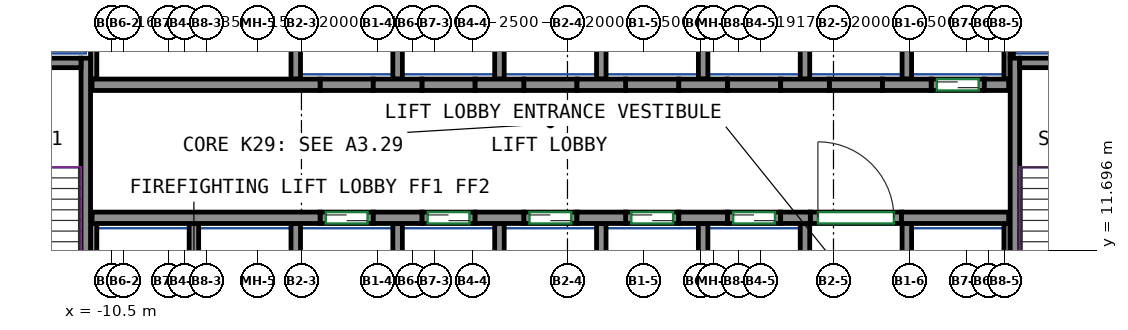
"""IFC4 building model, lengths in metres.
Left out: names, types, materials, properties, quantities, classifications, styles, units other than length and angle.
Written with IfcOpenShell. Run it as: python <this file> out.ifc"""

import sys

from ifc_helpers import new_model, si_unit, direction, frame, frame_2d, origin, place, context, subcontext, project, spatial, rectangle, extrude, source, transform, mapped, element, fill, save


model = new_model("IFC4")
c1 = context("Model", 3, precision=1e-05, world=origin(), true_north=direction((0.0, 1.0)))
c2 = subcontext(c1, "Body", "Model", "MODEL_VIEW")
j1 = project(units=[si_unit("LENGTHUNIT", "METRE"), si_unit("PLANEANGLEUNIT", "RADIAN")], contexts=[c1])
p1 = place(None, origin())
s1 = spatial("IfcSite", under=j1, at=p1, CompositionType="ELEMENT")
p2 = place(p1, origin())
s2 = spatial("IfcBuilding", under=s1, at=p2, CompositionType="ELEMENT")
p3 = place(p2, frame((0.0, 0.0, 120.6)))
s3 = spatial("IfcBuildingStorey", under=s2, at=p3, CompositionType="ELEMENT", Elevation=120.6)
m1 = source(origin(), c2, "Body", "SweptSolid", [
    extrude(rectangle(XDim=7.75, YDim=0.25, at=frame_2d((3.875, 0.0))), origin(), (0.0, 0.0, 1.0), 3.72),
])
p4 = place(p3, frame((-11.175, 9.0, 0.0), z_axis=(0.0, 0.0, 1.0), x_axis=(0.0, 1.0, 0.0)))
e1 = element("IfcWall", 1, at=p4, inside=s3, PredefinedType="SHEAR", context=c2, shape_type="MappedRepresentation", body=[
    mapped(m1, transform((0.0, 0.0, 0.0))),
])
m2 = source(origin(), c2, "Body", "SweptSolid", [
    extrude(rectangle(XDim=3.7, YDim=0.25, at=frame_2d((1.85, 0.0))), origin(), (0.0, 0.0, 1.0), 3.72),
])
p5 = place(p3, frame((-15.0, 16.625, 0.0), z_axis=(0.0, 0.0, 1.0), x_axis=(1.0, 0.0, 0.0)))
e2 = element("IfcWall", 2, at=p5, inside=s3, PredefinedType="SHEAR", context=c2, shape_type="MappedRepresentation", body=[
    mapped(m2, transform((0.0, 0.0, 0.0))),
])
p6 = place(p3, frame((13.275, 9.0, 0.0), z_axis=(0.0, 0.0, 1.0), x_axis=(0.0, 1.0, 0.0)))
e3 = element("IfcWall", 3, at=p6, inside=s3, PredefinedType="SHEAR", context=c2, shape_type="MappedRepresentation", body=[
    mapped(m1, transform((0.0, 0.0, 0.0))),
])
m3 = source(origin(), c2, "Body", "SweptSolid", [
    extrude(rectangle(XDim=3.7, YDim=0.25, at=frame_2d((1.85, 0.0))), origin(), (0.0, 0.0, 1.0), 3.72),
])
p7 = place(p3, frame((13.4, 16.625, 0.0), z_axis=(0.0, 0.0, 1.0), x_axis=(1.0, 0.0, 0.0)))
e4 = element("IfcWall", 4, at=p7, inside=s3, PredefinedType="SHEAR", context=c2, shape_type="MappedRepresentation", body=[
    mapped(m3, transform((0.0, 0.0, 0.0))),
])
m4 = source(origin(), c2, "Body", "SweptSolid", [
    extrude(rectangle(XDim=6.0, YDim=0.3, at=frame_2d((3.0, 0.0))), origin(), (0.0, 0.0, 1.0), 3.72),
])
p8 = place(p3, frame((-11.01, 12.55, 0.0), z_axis=(0.0, 0.0, 1.0), x_axis=(1.0, 0.0, 0.0)))
e5 = element("IfcWall", 5, at=p8, inside=s3, PredefinedType="SHEAR", context=c2, shape_type="MappedRepresentation", body=[
    mapped(m4, transform((0.0, 0.0, 0.0))),
])
m5 = source(origin(), c2, "Body", "SweptSolid", [
    extrude(rectangle(XDim=1.28, YDim=0.3, at=frame_2d((0.64, 0.0))), origin(), (0.0, 0.0, 1.0), 3.72),
])
for number, where, z_axis, x_axis in (
    (6, (-3.61, 12.55, 0.0), (0.0, 0.0, 1.0), (1.0, 0.0, 0.0)),
    (7, (-0.93, 12.55, 0.0), (0.0, 0.0, 1.0), (1.0, 0.0, 0.0)),
    (8, (1.75, 12.55, 0.0), (0.0, 0.0, 1.0), (1.0, 0.0, 0.0)),
    (9, (4.43, 12.55, 0.0), (0.0, 0.0, 1.0), (1.0, 0.0, 0.0)),
):
    element("IfcWall", number, at=place(p3, frame(where, z_axis=z_axis, x_axis=x_axis)), inside=s3, PredefinedType="SHEAR", context=c2, shape_type="MappedRepresentation", body=[
        mapped(m5, transform((0.0, 0.0, 0.0))),
    ])
m6 = source(origin(), c2, "Body", "SweptSolid", [
    extrude(rectangle(XDim=0.78, YDim=0.3, at=frame_2d((0.39, 0.0))), origin(), (0.0, 0.0, 1.0), 3.72),
])
p9 = place(p3, frame((7.11, 12.55, 0.0), z_axis=(0.0, 0.0, 1.0), x_axis=(1.0, 0.0, 0.0)))
e10 = element("IfcWall", 10, at=p9, inside=s3, PredefinedType="SHEAR", context=c2, shape_type="MappedRepresentation", body=[
    mapped(m6, transform((0.0, 0.0, 0.0))),
])
m7 = source(origin(), c2, "Body", "SweptSolid", [
    extrude(rectangle(XDim=2.82, YDim=0.3, at=frame_2d((1.41, 0.0))), origin(), (0.0, 0.0, 1.0), 3.72),
])
p10 = place(p3, frame((10.29, 12.55, 0.0), z_axis=(0.0, 0.0, 1.0), x_axis=(1.0, 0.0, 0.0)))
e11 = element("IfcWall", 11, at=p10, inside=s3, PredefinedType="SHEAR", context=c2, shape_type="MappedRepresentation", body=[
    mapped(m7, transform((0.0, 0.0, 0.0))),
])
p11 = place(p3, frame((-11.01, 16.05, 0.0), z_axis=(0.0, 0.0, 1.0), x_axis=(1.0, 0.0, 0.0)))
e12 = element("IfcWall", 12, at=p11, inside=s3, PredefinedType="SHEAR", context=c2, shape_type="MappedRepresentation", body=[
    mapped(m4, transform((0.0, 0.0, 0.0))),
])
for number, where, z_axis, x_axis in (
    (13, (-3.61, 16.05, 0.0), (0.0, 0.0, 1.0), (1.0, 0.0, 0.0)),
    (14, (-0.93, 16.05, 0.0), (0.0, 0.0, 1.0), (1.0, 0.0, 0.0)),
    (15, (1.75, 16.05, 0.0), (0.0, 0.0, 1.0), (1.0, 0.0, 0.0)),
    (16, (4.43, 16.05, 0.0), (0.0, 0.0, 1.0), (1.0, 0.0, 0.0)),
):
    element("IfcWall", number, at=place(p3, frame(where, z_axis=z_axis, x_axis=x_axis)), inside=s3, PredefinedType="SHEAR", context=c2, shape_type="MappedRepresentation", body=[
        mapped(m5, transform((0.0, 0.0, 0.0))),
    ])
m8 = source(origin(), c2, "Body", "SweptSolid", [
    extrude(rectangle(XDim=1.28, YDim=0.3, at=frame_2d((0.64, 0.0))), origin(), (0.0, 0.0, 1.0), 3.72),
])
p12 = place(p3, frame((7.11, 16.05, 0.0), z_axis=(0.0, 0.0, 1.0), x_axis=(1.0, 0.0, 0.0)))
e17 = element("IfcWall", 17, at=p12, inside=s3, PredefinedType="SHEAR", context=c2, shape_type="MappedRepresentation", body=[
    mapped(m8, transform((0.0, 0.0, 0.0))),
])
p13 = place(p3, frame((9.79, 16.05, 0.0), z_axis=(0.0, 0.0, 1.0), x_axis=(1.0, 0.0, 0.0)))
e18 = element("IfcWall", 18, at=p13, inside=s3, PredefinedType="SHEAR", context=c2, shape_type="MappedRepresentation", body=[
    mapped(m5, transform((0.0, 0.0, 0.0))),
])
m9 = source(origin(), c2, "Body", "SweptSolid", [
    extrude(rectangle(XDim=0.64, YDim=0.3, at=frame_2d((0.32, 0.0))), origin(), (0.0, 0.0, 1.0), 3.72),
])
p14 = place(p3, frame((12.47, 16.05, 0.0), z_axis=(0.0, 0.0, 1.0), x_axis=(1.0, 0.0, 0.0)))
e19 = element("IfcWall", 19, at=p14, inside=s3, PredefinedType="SHEAR", context=c2, shape_type="MappedRepresentation", body=[
    mapped(m9, transform((0.0, 0.0, 0.0))),
])
m10 = source(origin(), c2, "Body", "SweptSolid", [
    extrude(rectangle(XDim=1.4, YDim=0.3, at=frame_2d((0.7, 0.0))), origin(), (0.0, 0.0, 1.0), 3.72),
])
p15 = place(p3, frame((-5.01, 12.55, 0.0), z_axis=(0.0, 0.0, 1.0), x_axis=(1.0, 0.0, 0.0)))
e20 = element("IfcWall", 20, at=p15, inside=s3, PredefinedType="PARTITIONING", context=c2, shape_type="MappedRepresentation", body=[
    mapped(m10, transform((0.0, 0.0, 0.0))),
])
p16 = place(p15, frame((0.15, 0.0, 0.0)))
e21 = element("IfcOpeningElement", 21, at=p16, cuts=e20, PredefinedType="OPENING", context=c2, shape_type="SweptSolid", body=[
    extrude(rectangle(XDim=1.1, YDim=2.1, at=frame_2d((0.55, 1.05))), frame((0.0, 0.16, 0.0), z_axis=(0.0, -1.0, 0.0), x_axis=(1.0, 0.0, 0.0)), (0.0, 0.0, 1.0), 0.32),
])
m11 = source(origin(), c2, "Body", "SweptSolid", [
    extrude(rectangle(XDim=1.4, YDim=0.3, at=frame_2d((0.7, 0.0))), origin(), (0.0, 0.0, 1.0), 3.72),
])
p17 = place(p3, frame((-2.33, 12.55, 0.0), z_axis=(0.0, 0.0, 1.0), x_axis=(1.0, 0.0, 0.0)))
e22 = element("IfcWall", 22, at=p17, inside=s3, PredefinedType="PARTITIONING", context=c2, shape_type="MappedRepresentation", body=[
    mapped(m11, transform((0.0, 0.0, 0.0))),
])
p18 = place(p17, frame((0.15, 0.0, 0.0)))
e23 = element("IfcOpeningElement", 23, at=p18, cuts=e22, PredefinedType="OPENING", context=c2, shape_type="SweptSolid", body=[
    extrude(rectangle(XDim=1.1, YDim=2.1, at=frame_2d((0.55, 1.05))), frame((0.0, 0.16, 0.0), z_axis=(0.0, -1.0, 0.0), x_axis=(1.0, 0.0, 0.0)), (0.0, 0.0, 1.0), 0.32),
])
p19 = place(p3, frame((0.35, 12.55, 0.0), z_axis=(0.0, 0.0, 1.0), x_axis=(1.0, 0.0, 0.0)))
e24 = element("IfcWall", 24, at=p19, inside=s3, PredefinedType="PARTITIONING", context=c2, shape_type="MappedRepresentation", body=[
    mapped(m10, transform((0.0, 0.0, 0.0))),
])
p20 = place(p19, frame((0.15, 0.0, 0.0)))
e25 = element("IfcOpeningElement", 25, at=p20, cuts=e24, PredefinedType="OPENING", context=c2, shape_type="SweptSolid", body=[
    extrude(rectangle(XDim=1.1, YDim=2.1, at=frame_2d((0.55, 1.05))), frame((0.0, 0.16, 0.0), z_axis=(0.0, -1.0, 0.0), x_axis=(1.0, 0.0, 0.0)), (0.0, 0.0, 1.0), 0.32),
])
p21 = place(p3, frame((3.03, 12.55, 0.0), z_axis=(0.0, 0.0, 1.0), x_axis=(1.0, 0.0, 0.0)))
e26 = element("IfcWall", 26, at=p21, inside=s3, PredefinedType="PARTITIONING", context=c2, shape_type="MappedRepresentation", body=[
    mapped(m10, transform((0.0, 0.0, 0.0))),
])
p22 = place(p21, frame((0.15, 0.0, 0.0)))
e27 = element("IfcOpeningElement", 27, at=p22, cuts=e26, PredefinedType="OPENING", context=c2, shape_type="SweptSolid", body=[
    extrude(rectangle(XDim=1.1, YDim=2.1, at=frame_2d((0.55, 1.05))), frame((0.0, 0.16, 0.0), z_axis=(0.0, -1.0, 0.0), x_axis=(1.0, 0.0, 0.0)), (0.0, 0.0, 1.0), 0.32),
])
p23 = place(p3, frame((5.71, 12.55, 0.0), z_axis=(0.0, 0.0, 1.0), x_axis=(1.0, 0.0, 0.0)))
e28 = element("IfcWall", 28, at=p23, inside=s3, PredefinedType="PARTITIONING", context=c2, shape_type="MappedRepresentation", body=[
    mapped(m11, transform((0.0, 0.0, 0.0))),
])
p24 = place(p23, frame((0.15, 0.0, 0.0)))
e29 = element("IfcOpeningElement", 29, at=p24, cuts=e28, PredefinedType="OPENING", context=c2, shape_type="SweptSolid", body=[
    extrude(rectangle(XDim=1.1, YDim=2.1, at=frame_2d((0.55, 1.05))), frame((0.0, 0.16, 0.0), z_axis=(0.0, -1.0, 0.0), x_axis=(1.0, 0.0, 0.0)), (0.0, 0.0, 1.0), 0.32),
])
p25 = place(p3, frame((11.07, 16.05, 0.0), z_axis=(0.0, 0.0, 1.0), x_axis=(1.0, 0.0, 0.0)))
e30 = element("IfcWall", 30, at=p25, inside=s3, PredefinedType="PARTITIONING", context=c2, shape_type="MappedRepresentation", body=[
    mapped(m10, transform((0.0, 0.0, 0.0))),
])
p26 = place(p25, frame((0.15, 0.0, 0.0)))
e31 = element("IfcOpeningElement", 31, at=p26, cuts=e30, PredefinedType="OPENING", context=c2, shape_type="SweptSolid", body=[
    extrude(rectangle(XDim=1.1, YDim=2.1, at=frame_2d((0.55, 1.05))), frame((0.0, 0.16, 0.0), z_axis=(0.0, -1.0, 0.0), x_axis=(1.0, 0.0, 0.0)), (0.0, 0.0, 1.0), 0.32),
])
m12 = source(origin(), c2, "Body", "SweptSolid", [
    extrude(rectangle(XDim=2.4, YDim=0.3, at=frame_2d((1.2, 0.0))), origin(), (0.0, 0.0, 1.0), 3.72),
])
p27 = place(p3, frame((7.89, 12.55, 0.0), z_axis=(0.0, 0.0, 1.0), x_axis=(1.0, 0.0, 0.0)))
e32 = element("IfcWall", 32, at=p27, inside=s3, PredefinedType="PARTITIONING", context=c2, shape_type="MappedRepresentation", body=[
    mapped(m12, transform((0.0, 0.0, 0.0))),
])
p28 = place(p27, frame((0.2, 0.0, 0.0)))
e33 = element("IfcOpeningElement", 33, at=p28, cuts=e32, PredefinedType="OPENING", context=c2, shape_type="SweptSolid", body=[
    extrude(rectangle(XDim=2.0, YDim=2.1, at=frame_2d((1.0, 1.05))), frame((0.0, 0.16, 0.0), z_axis=(0.0, -1.0, 0.0), x_axis=(1.0, 0.0, 0.0)), (0.0, 0.0, 1.0), 0.32),
])
p29 = place(p3, frame((-5.01, 16.05, 0.0), z_axis=(0.0, 0.0, 1.0), x_axis=(1.0, 0.0, 0.0)))
e34 = element("IfcWall", 34, at=p29, inside=s3, PredefinedType="PARTITIONING", context=c2, shape_type="MappedRepresentation", body=[
    mapped(m10, transform((0.0, 0.0, 0.0))),
])
p30 = place(p3, frame((-2.33, 16.05, 0.0), z_axis=(0.0, 0.0, 1.0), x_axis=(1.0, 0.0, 0.0)))
e35 = element("IfcWall", 35, at=p30, inside=s3, PredefinedType="PARTITIONING", context=c2, shape_type="MappedRepresentation", body=[
    mapped(m11, transform((0.0, 0.0, 0.0))),
])
for number, where, z_axis, x_axis in (
    (36, (0.35, 16.05, 0.0), (0.0, 0.0, 1.0), (1.0, 0.0, 0.0)),
    (37, (3.03, 16.05, 0.0), (0.0, 0.0, 1.0), (1.0, 0.0, 0.0)),
):
    element("IfcWall", number, at=place(p3, frame(where, z_axis=z_axis, x_axis=x_axis)), inside=s3, PredefinedType="PARTITIONING", context=c2, shape_type="MappedRepresentation", body=[
        mapped(m10, transform((0.0, 0.0, 0.0))),
    ])
for number, where, z_axis, x_axis in (
    (38, (5.71, 16.05, 0.0), (0.0, 0.0, 1.0), (1.0, 0.0, 0.0)),
    (39, (8.39, 16.05, 0.0), (0.0, 0.0, 1.0), (1.0, 0.0, 0.0)),
):
    element("IfcWall", number, at=place(p3, frame(where, z_axis=z_axis, x_axis=x_axis)), inside=s3, PredefinedType="PARTITIONING", context=c2, shape_type="MappedRepresentation", body=[
        mapped(m11, transform((0.0, 0.0, 0.0))),
    ])
m13 = source(origin(), c2, "Body", "SweptSolid", [
    extrude(rectangle(XDim=3.275, YDim=0.165, at=frame_2d((1.638, 0.0))), origin(), (0.0, 0.0, 1.0), 3.72),
])
p31 = place(p3, frame((13.067, 16.2, 0.0), z_axis=(0.0, 0.0, 1.0), x_axis=(0.0, 1.0, 0.0)))
e40 = element("IfcWall", 40, at=p31, inside=s3, PredefinedType="PARTITIONING", context=c2, shape_type="MappedRepresentation", body=[
    mapped(m13, transform((0.0, 0.0, 0.0))),
])
m14 = source(origin(), c2, "Body", "SweptSolid", [
    extrude(rectangle(XDim=4.8, YDim=0.165, at=frame_2d((2.4, 0.0))), origin(), (0.0, 0.0, 1.0), 3.72),
])
p32 = place(p3, frame((-10.968, 16.2, 0.0), z_axis=(0.0, 0.0, 1.0), x_axis=(0.0, 1.0, 0.0)))
e41 = element("IfcWall", 41, at=p32, inside=s3, PredefinedType="PARTITIONING", context=c2, shape_type="MappedRepresentation", body=[
    mapped(m14, transform((0.0, 0.0, 0.0))),
])
m15 = source(origin(), c2, "Body", "SweptSolid", [
    extrude(rectangle(XDim=3.275, YDim=0.25, at=frame_2d((1.638, 0.0))), origin(), (0.0, 0.0, 1.0), 3.72),
])
p33 = place(p3, frame((10.43, 16.2, 0.0), z_axis=(0.0, 0.0, 1.0), x_axis=(0.0, 1.0, 0.0)))
e42 = element("IfcWall", 42, at=p33, inside=s3, PredefinedType="PARTITIONING", context=c2, shape_type="MappedRepresentation", body=[
    mapped(m15, transform((0.0, 0.0, 0.0))),
])
m16 = source(origin(), c2, "Body", "SweptSolid", [
    extrude(rectangle(XDim=2.725, YDim=0.085, at=frame_2d((1.363, 0.0))), origin(), (0.0, 0.0, 1.0), 3.72),
])
p34 = place(p3, frame((13.192, 16.75, 0.0), z_axis=(0.0, 0.0, 1.0), x_axis=(0.0, 1.0, 0.0)))
e43 = element("IfcWall", 43, at=p34, inside=s3, PredefinedType="PARTITIONING", context=c2, shape_type="MappedRepresentation", body=[
    mapped(m16, transform((0.0, 0.0, 0.0))),
])
for number, where, z_axis, x_axis in (
    (44, (2.39, 16.2, 0.0), (0.0, 0.0, 1.0), (0.0, 1.0, 0.0)),
    (45, (5.07, 16.2, 0.0), (0.0, 0.0, 1.0), (0.0, 1.0, 0.0)),
    (46, (7.75, 16.2, 0.0), (0.0, 0.0, 1.0), (0.0, 1.0, 0.0)),
    (47, (-0.29, 16.2, 0.0), (0.0, 0.0, 1.0), (0.0, 1.0, 0.0)),
    (48, (-2.97, 16.2, 0.0), (0.0, 0.0, 1.0), (0.0, 1.0, 0.0)),
    (49, (-5.65, 16.2, 0.0), (0.0, 0.0, 1.0), (0.0, 1.0, 0.0)),
):
    element("IfcWall", number, at=place(p3, frame(where, z_axis=z_axis, x_axis=x_axis)), inside=s3, PredefinedType="PARTITIONING", context=c2, shape_type="MappedRepresentation", body=[
        mapped(m15, transform((0.0, 0.0, 0.0))),
    ])
m17 = source(origin(), c2, "Body", "SweptSolid", [
    extrude(rectangle(XDim=3.4, YDim=0.25, at=frame_2d((1.7, 0.0))), origin(), (0.0, 0.0, 1.0), 3.72),
])
p35 = place(p3, frame((10.43, 9.0, 0.0), z_axis=(0.0, 0.0, 1.0), x_axis=(0.0, 1.0, 0.0)))
e50 = element("IfcWall", 50, at=p35, inside=s3, PredefinedType="PARTITIONING", context=c2, shape_type="MappedRepresentation", body=[
    mapped(m17, transform((0.0, 0.0, 0.0))),
])
m18 = source(origin(), c2, "Body", "SweptSolid", [
    extrude(rectangle(XDim=3.4, YDim=0.165, at=frame_2d((1.7, 0.0))), origin(), (0.0, 0.0, 1.0), 3.72),
])
p36 = place(p3, frame((13.067, 9.0, 0.0), z_axis=(0.0, 0.0, 1.0), x_axis=(0.0, 1.0, 0.0)))
e51 = element("IfcWall", 51, at=p36, inside=s3, PredefinedType="PARTITIONING", context=c2, shape_type="MappedRepresentation", body=[
    mapped(m18, transform((0.0, 0.0, 0.0))),
])
for number, where, z_axis, x_axis in (
    (52, (2.39, 9.0, 0.0), (0.0, 0.0, 1.0), (0.0, 1.0, 0.0)),
    (53, (5.07, 9.0, 0.0), (0.0, 0.0, 1.0), (0.0, 1.0, 0.0)),
    (54, (7.75, 9.0, 0.0), (0.0, 0.0, 1.0), (0.0, 1.0, 0.0)),
    (55, (-0.29, 9.0, 0.0), (0.0, 0.0, 1.0), (0.0, 1.0, 0.0)),
):
    element("IfcWall", number, at=place(p3, frame(where, z_axis=z_axis, x_axis=x_axis)), inside=s3, PredefinedType="PARTITIONING", context=c2, shape_type="MappedRepresentation", body=[
        mapped(m17, transform((0.0, 0.0, 0.0))),
    ])
p37 = place(p3, frame((-10.968, 9.0, 0.0), z_axis=(0.0, 0.0, 1.0), x_axis=(0.0, 1.0, 0.0)))
e56 = element("IfcWall", 56, at=p37, inside=s3, PredefinedType="PARTITIONING", context=c2, shape_type="MappedRepresentation", body=[
    mapped(m18, transform((0.0, 0.0, 0.0))),
])
for number, where, z_axis, x_axis in (
    (57, (-2.97, 9.0, 0.0), (0.0, 0.0, 1.0), (0.0, 1.0, 0.0)),
    (58, (-5.65, 9.0, 0.0), (0.0, 0.0, 1.0), (0.0, 1.0, 0.0)),
    (59, (-8.33, 9.0, 0.0), (0.0, 0.0, 1.0), (0.0, 1.0, 0.0)),
):
    element("IfcWall", number, at=place(p3, frame(where, z_axis=z_axis, x_axis=x_axis)), inside=s3, PredefinedType="PARTITIONING", context=c2, shape_type="MappedRepresentation", body=[
        mapped(m17, transform((0.0, 0.0, 0.0))),
    ])
p38 = place(p28, origin())
e60 = element("IfcDoor", 60, at=p38, inside=s3, OperationType="DOUBLE_DOOR_SINGLE_SWING", PredefinedType="DOOR", context=c2, shape_type="SweptSolid", body=[
    extrude(rectangle(XDim=2.0, YDim=2.1, at=frame_2d((1.0, 1.05))), frame((0.0, 0.025, 0.0), z_axis=(0.0, -1.0, 0.0), x_axis=(1.0, 0.0, 0.0)), (0.0, 0.0, 1.0), 0.05),
])
fill(e33, e60)
p39 = place(p16, origin())
e61 = element("IfcDoor", 61, at=p39, inside=s3, OperationType="DOUBLE_DOOR_SLIDING", PredefinedType="DOOR", context=c2, shape_type="SweptSolid", body=[
    extrude(rectangle(XDim=1.1, YDim=2.1, at=frame_2d((0.55, 1.05))), frame((0.0, 0.025, 0.0), z_axis=(0.0, -1.0, 0.0), x_axis=(1.0, 0.0, 0.0)), (0.0, 0.0, 1.0), 0.05),
])
fill(e21, e61)
p40 = place(p18, origin())
e62 = element("IfcDoor", 62, at=p40, inside=s3, OperationType="DOUBLE_DOOR_SLIDING", PredefinedType="DOOR", context=c2, shape_type="SweptSolid", body=[
    extrude(rectangle(XDim=1.1, YDim=2.1, at=frame_2d((0.55, 1.05))), frame((0.0, 0.025, 0.0), z_axis=(0.0, -1.0, 0.0), x_axis=(1.0, 0.0, 0.0)), (0.0, 0.0, 1.0), 0.05),
])
fill(e23, e62)
p41 = place(p20, origin())
e63 = element("IfcDoor", 63, at=p41, inside=s3, OperationType="DOUBLE_DOOR_SLIDING", PredefinedType="DOOR", context=c2, shape_type="SweptSolid", body=[
    extrude(rectangle(XDim=1.1, YDim=2.1, at=frame_2d((0.55, 1.05))), frame((0.0, 0.025, 0.0), z_axis=(0.0, -1.0, 0.0), x_axis=(1.0, 0.0, 0.0)), (0.0, 0.0, 1.0), 0.05),
])
fill(e25, e63)
p42 = place(p22, origin())
e64 = element("IfcDoor", 64, at=p42, inside=s3, OperationType="DOUBLE_DOOR_SLIDING", PredefinedType="DOOR", context=c2, shape_type="SweptSolid", body=[
    extrude(rectangle(XDim=1.1, YDim=2.1, at=frame_2d((0.55, 1.05))), frame((0.0, 0.025, 0.0), z_axis=(0.0, -1.0, 0.0), x_axis=(1.0, 0.0, 0.0)), (0.0, 0.0, 1.0), 0.05),
])
fill(e27, e64)
p43 = place(p24, origin())
e65 = element("IfcDoor", 65, at=p43, inside=s3, OperationType="DOUBLE_DOOR_SLIDING", PredefinedType="DOOR", context=c2, shape_type="SweptSolid", body=[
    extrude(rectangle(XDim=1.1, YDim=2.1, at=frame_2d((0.55, 1.05))), frame((0.0, 0.025, 0.0), z_axis=(0.0, -1.0, 0.0), x_axis=(1.0, 0.0, 0.0)), (0.0, 0.0, 1.0), 0.05),
])
fill(e29, e65)
p44 = place(p26, origin())
e66 = element("IfcDoor", 66, at=p44, inside=s3, OperationType="DOUBLE_DOOR_SLIDING", PredefinedType="DOOR", context=c2, shape_type="SweptSolid", body=[
    extrude(rectangle(XDim=1.1, YDim=2.1, at=frame_2d((0.55, 1.05))), frame((0.0, 0.025, 0.0), z_axis=(0.0, -1.0, 0.0), x_axis=(1.0, 0.0, 0.0)), (0.0, 0.0, 1.0), 0.05),
])
fill(e31, e66)
save(model, sys.argv[1])
